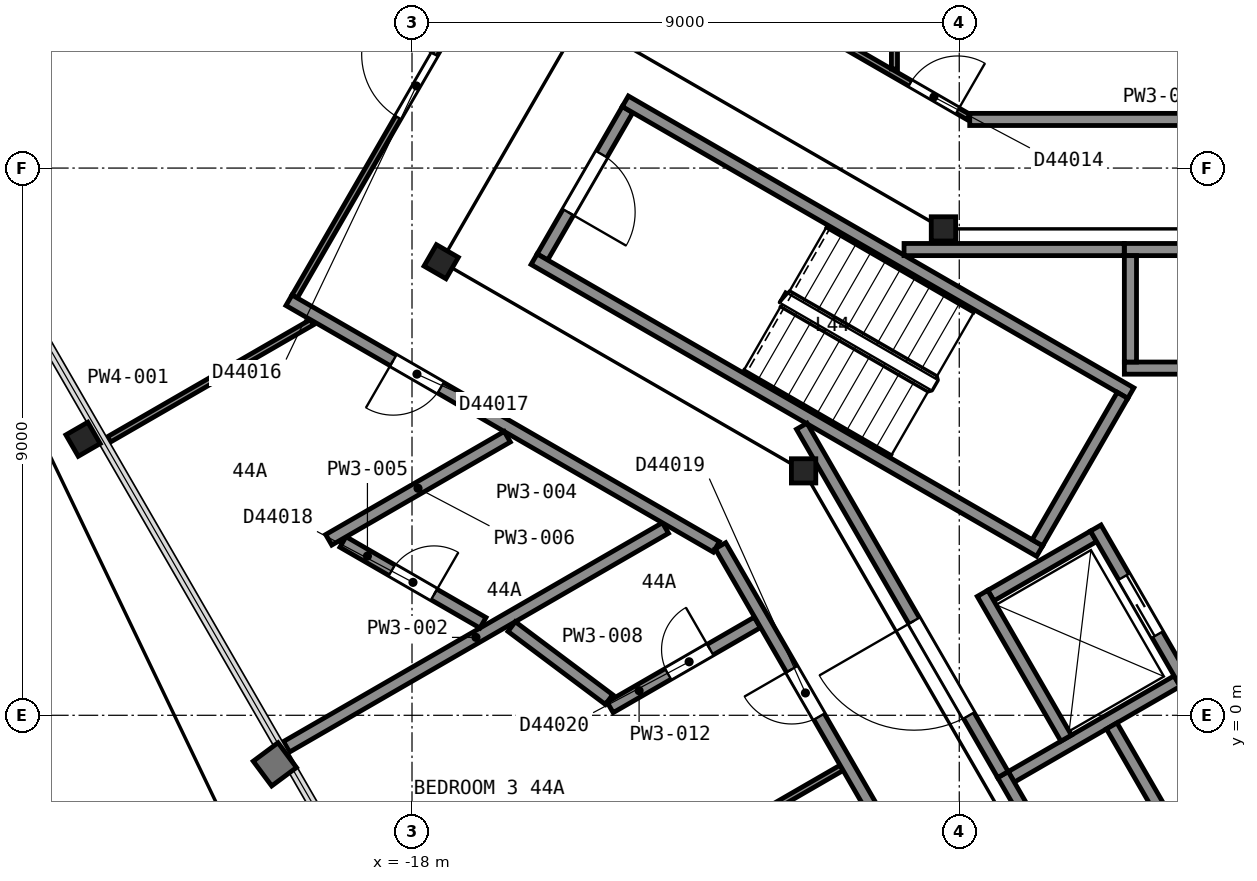
"""IFC4 building model, lengths in metres.
Left out: names, types, materials, properties, quantities, classifications, styles, units other than length and angle.
Written with IfcOpenShell. Run it as: python <this file> out.ifc"""

import sys

from ifc_helpers import new_model, si_unit, direction, frame, frame_2d, origin, origin_2d, place, context, subcontext, project, spatial, rectangle, i_section, extrude, element, fill, save


model = new_model("IFC4")
c1 = context("Model", 3, precision=1e-05, world=origin(), true_north=direction((0.0, 1.0)))
c2 = subcontext(c1, "Body", "Model", "MODEL_VIEW")
j1 = project(units=[si_unit("LENGTHUNIT", "METRE"), si_unit("PLANEANGLEUNIT", "RADIAN")], contexts=[c1])
p1 = place(None, origin())
s1 = spatial("IfcSite", under=j1, at=p1, CompositionType="ELEMENT")
p2 = place(p1, origin())
s2 = spatial("IfcBuilding", under=s1, at=p2, CompositionType="ELEMENT")
p3 = place(p2, frame((0.0, 0.0, 178.4)))
s3 = spatial("IfcBuildingStorey", under=s2, at=p3, CompositionType="ELEMENT", Elevation=178.4)
p4 = place(p3, frame((-23.41, 4.54, 0.04), z_axis=(0.0, 0.0, 1.0), x_axis=(-0.5, 0.866025403784, 0.0)))
e1 = element("IfcColumn", 1, at=p4, inside=s3, PredefinedType="COLUMN", context=c2, shape_type="SweptSolid", body=[
    extrude(i_section(OverallWidth=0.406, OverallDepth=0.417, WebThickness=0.03, FlangeThickness=0.048, FilletRadius=0.015, at=origin_2d()), origin(), (0.0, 0.0, 1.0), 3.66),
])
p5 = place(p3, frame((-9.26, 8.0, 0.0), z_axis=(0.0, 0.0, 1.0), x_axis=(1.0, 0.0, 0.0)))
e2 = element("IfcColumn", 2, at=p5, inside=s3, PredefinedType="COLUMN", context=c2, shape_type="SweptSolid", body=[
    extrude(i_section(OverallWidth=0.401, OverallDepth=0.399, WebThickness=0.025, FlangeThickness=0.04, FilletRadius=0.015, at=origin_2d()), origin(), (0.0, 0.0, 1.0), 3.7),
])
p6 = place(p3, frame((-17.52, 7.46, 0.0), z_axis=(0.0, 0.0, 1.0), x_axis=(0.5, 0.866025403784, 0.0)))
e3 = element("IfcColumn", 3, at=p6, inside=s3, PredefinedType="COLUMN", context=c2, shape_type="SweptSolid", body=[
    extrude(i_section(OverallWidth=0.406, OverallDepth=0.417, WebThickness=0.03, FlangeThickness=0.048, FilletRadius=0.015, at=origin_2d()), origin(), (0.0, 0.0, 1.0), 3.7),
])
p7 = place(p3, frame((-11.56, 4.02, 0.0), z_axis=(0.0, 0.0, 1.0), x_axis=(1.0, 0.0, 0.0)))
e4 = element("IfcColumn", 4, at=p7, inside=s3, PredefinedType="COLUMN", context=c2, shape_type="SweptSolid", body=[
    extrude(i_section(OverallWidth=0.401, OverallDepth=0.399, WebThickness=0.025, FlangeThickness=0.04, FilletRadius=0.015, at=origin_2d()), origin(), (0.0, 0.0, 1.0), 3.7),
])
p8 = place(p3, frame((-14.455, 9.962, 0.0), z_axis=(0.0, 0.0, 1.0), x_axis=(-0.500049511043, -0.865996816683, 0.0)))
e5 = element("IfcWall", 5, at=p8, inside=s3, PredefinedType="PARTITIONING", context=c2, shape_type="SweptSolid", body=[
    extrude(rectangle(XDim=2.8, YDim=0.2, at=frame_2d((1.4, 0.0))), origin(), (0.0, 0.0, 1.0), 3.45),
])
p9 = place(p8, frame((0.85, 0.0, 0.0)))
e6 = element("IfcOpeningElement", 6, at=p9, cuts=e5, PredefinedType="OPENING", context=c2, shape_type="SweptSolid", body=[
    extrude(rectangle(XDim=1.1, YDim=2.1, at=frame_2d((0.55, 1.05))), frame((0.0, 0.11, 0.0), z_axis=(0.0, -1.0, 0.0), x_axis=(1.0, 0.0, 0.0)), (0.0, 0.0, 1.0), 0.22),
])
for number, where, z_axis, x_axis in (
    (7, (-7.678, 2.701, 0.0), (0.0, 0.0, 1.0), (-0.866, 0.5, 0.0)),
    (8, (-6.178, 5.299, 0.0), (0.0, 0.0, 1.0), (-0.866, 0.5, 0.0)),
):
    element("IfcWall", number, at=place(p3, frame(where, z_axis=z_axis, x_axis=x_axis)), inside=s3, PredefinedType="PARTITIONING", context=c2, shape_type="SweptSolid", body=[
        extrude(rectangle(XDim=9.6, YDim=0.2, at=frame_2d((4.8, 0.0))), origin(), (0.0, 0.0, 1.0), 3.45),
    ])
p10 = place(p3, frame((-6.315, 5.262, 0.0), z_axis=(0.0, 0.0, 1.0), x_axis=(-0.500049511043, -0.865996816683, 0.0)))
e9 = element("IfcWall", 9, at=p10, inside=s3, PredefinedType="PARTITIONING", context=c2, shape_type="SweptSolid", body=[
    extrude(rectangle(XDim=2.8, YDim=0.2, at=frame_2d((1.4, 0.0))), origin(), (0.0, 0.0, 1.0), 3.45),
])
for number, where, z_axis, x_axis in (
    (10, (-6.285, 5.71, 0.0), (0.0, 0.0, 1.0), (1.0, 0.0, 0.0)),
    (11, (-6.285, 7.66, 0.0), (0.0, 0.0, 1.0), (1.0, 0.0, 0.0)),
):
    element("IfcWall", number, at=place(p3, frame(where, z_axis=z_axis, x_axis=x_axis)), inside=s3, PredefinedType="PARTITIONING", context=c2, shape_type="SweptSolid", body=[
        extrude(rectangle(XDim=2.35, YDim=0.2, at=frame_2d((1.175, 0.0))), origin(), (0.0, 0.0, 1.0), 3.7),
    ])
p11 = place(p3, frame((-8.145, -1.013, 0.0), z_axis=(0.0, 0.0, 1.0), x_axis=(0.866016494683, 0.500015430699, 0.0)))
e12 = element("IfcWall", 12, at=p11, inside=s3, PredefinedType="PARTITIONING", context=c2, shape_type="SweptSolid", body=[
    extrude(rectangle(XDim=3.15, YDim=0.2, at=frame_2d((1.575, 0.0))), origin(), (0.0, 0.0, 1.0), 3.7),
])
p12 = place(p3, frame((-8.48, 1.969, 0.0), z_axis=(0.0, 0.0, 1.0), x_axis=(0.866000020948, 0.500043961785, 0.0)))
e13 = element("IfcWall", 13, at=p12, inside=s3, PredefinedType="PARTITIONING", context=c2, shape_type="SweptSolid", body=[
    extrude(rectangle(XDim=1.95, YDim=0.2, at=frame_2d((0.975, 0.0))), origin(), (0.0, 0.0, 1.0), 3.7),
])
p13 = place(p3, frame((-6.185, 5.81, 0.0), z_axis=(0.0, 0.0, 1.0), x_axis=(0.0, 1.0, 0.0)))
e14 = element("IfcWall", 14, at=p13, inside=s3, PredefinedType="PARTITIONING", context=c2, shape_type="SweptSolid", body=[
    extrude(rectangle(XDim=1.75, YDim=0.2, at=frame_2d((0.875, 0.0))), origin(), (0.0, 0.0, 1.0), 3.7),
])
p14 = place(p3, frame((-5.28, 0.525, 0.0), z_axis=(0.0, 0.0, 1.0), x_axis=(-0.500037662692, 0.866003658127, 0.0)))
e15 = element("IfcWall", 15, at=p14, inside=s3, PredefinedType="PARTITIONING", context=c2, shape_type="SweptSolid", body=[
    extrude(rectangle(XDim=2.95, YDim=0.2, at=frame_2d((1.475, 0.0))), origin(), (0.0, 0.0, 1.0), 3.7),
])
p15 = place(p14, frame((0.925, 0.0, 0.0)))
e16 = element("IfcOpeningElement", 16, at=p15, cuts=e15, PredefinedType="OPENING", context=c2, shape_type="SweptSolid", body=[
    extrude(rectangle(XDim=1.1, YDim=2.1, at=frame_2d((0.55, 1.05))), frame((0.0, 0.11, 0.0), z_axis=(0.0, -1.0, 0.0), x_axis=(1.0, 0.0, 0.0)), (0.0, 0.0, 1.0), 0.22),
])
p16 = place(p3, frame((-5.318, -2.21, 0.0), z_axis=(0.0, 0.0, 1.0), x_axis=(-0.499938297808, 0.866061024631, 0.0)))
e17 = element("IfcWall", 17, at=p16, inside=s3, PredefinedType="PARTITIONING", context=c2, shape_type="SweptSolid", body=[
    extrude(rectangle(XDim=2.35, YDim=0.2, at=frame_2d((1.175, 0.0))), origin(), (0.0, 0.0, 1.0), 3.7),
])
p17 = place(p3, frame((-7.242, -0.376, 0.0), z_axis=(0.0, 0.0, 1.0), x_axis=(-0.499996545922, 0.866027397988, 0.0)))
e18 = element("IfcWall", 18, at=p17, inside=s3, PredefinedType="PARTITIONING", context=c2, shape_type="SweptSolid", body=[
    extrude(rectangle(XDim=2.75, YDim=0.2, at=frame_2d((1.375, 0.0))), origin(), (0.0, 0.0, 1.0), 3.7),
])
p18 = place(p3, frame((-7.006, -3.185, 0.0), z_axis=(0.0, 0.0, 1.0), x_axis=(-0.499990435942, 0.866030925526, 0.0)))
e19 = element("IfcWall", 19, at=p18, inside=s3, PredefinedType="PARTITIONING", context=c2, shape_type="SweptSolid", body=[
    extrude(rectangle(XDim=2.55, YDim=0.2, at=frame_2d((1.275, 0.0))), origin(), (0.0, 0.0, 1.0), 3.7),
])
p19 = place(p3, frame((-11.591, 4.755, 0.0), z_axis=(0.0, 0.0, 1.0), x_axis=(0.500043977787, -0.866000011708, 0.0)))
e20 = element("IfcWall", 20, at=p19, inside=s3, PredefinedType="PARTITIONING", context=c2, shape_type="SweptSolid", body=[
    extrude(rectangle(XDim=6.617, YDim=0.2, at=frame_2d((3.308, 0.0))), origin(), (0.0, 0.0, 1.0), 3.45),
])
p20 = place(p19, frame((3.695, 0.0, 0.0)))
e21 = element("IfcOpeningElement", 21, at=p20, cuts=e20, PredefinedType="OPENING", context=c2, shape_type="SweptSolid", body=[
    extrude(rectangle(XDim=1.8, YDim=2.1, at=frame_2d((0.9, 1.05))), frame((0.0, 0.11, 0.0), z_axis=(0.0, -1.0, 0.0), x_axis=(1.0, 0.0, 0.0)), (0.0, 0.0, 1.0), 0.22),
])
p21 = place(p3, frame((-9.908, 7.66, 0.0), z_axis=(0.0, 0.0, 1.0), x_axis=(1.0, 0.0, 0.0)))
e22 = element("IfcWall", 22, at=p21, inside=s3, PredefinedType="PARTITIONING", context=c2, shape_type="SweptSolid", body=[
    extrude(rectangle(XDim=3.621, YDim=0.2, at=frame_2d((1.811, 0.0))), origin(), (0.0, 0.0, 1.0), 3.45),
])
p22 = place(p3, frame((-22.983, 4.538, 0.0), z_axis=(0.0, 0.0, 1.0), x_axis=(0.865988254995, 0.500064338071, 0.0)))
e23 = element("IfcWall", 23, at=p22, inside=s3, PredefinedType="PARTITIONING", context=c2, shape_type="SweptSolid", body=[
    extrude(rectangle(XDim=3.853, YDim=0.1, at=frame_2d((1.927, 0.0))), origin(), (0.0, 0.0, 1.0), 2.713),
])
p23 = place(p3, frame((-20.064, -0.518, 0.0), z_axis=(0.0, 0.0, 1.0), x_axis=(0.865994046034, 0.500054309285, 0.0)))
e24 = element("IfcWall", 24, at=p23, inside=s3, PredefinedType="PARTITIONING", context=c2, shape_type="SweptSolid", body=[
    extrude(rectangle(XDim=7.196, YDim=0.2, at=frame_2d((3.598, 0.0))), origin(), (0.0, 0.0, 1.0), 2.713),
])
p24 = place(p3, frame((-19.93, 6.888, 0.0), z_axis=(0.0, 0.0, 1.0), x_axis=(0.500413056211, 0.865786794294, 0.0)))
e25 = element("IfcWall", 25, at=p24, inside=s3, PredefinedType="PARTITIONING", context=c2, shape_type="SweptSolid", body=[
    extrude(rectangle(XDim=8.047, YDim=0.1, at=frame_2d((4.023, 0.0))), origin(), (0.0, 0.0, 1.0), 2.713),
])
p25 = place(p24, frame((3.4, 0.0, 0.0)))
e26 = element("IfcOpeningElement", 26, at=p25, cuts=e25, PredefinedType="OPENING", context=c2, shape_type="SweptSolid", body=[
    extrude(rectangle(XDim=1.2, YDim=2.1, at=frame_2d((0.6, 1.05))), frame((0.0, 0.06, 0.0), z_axis=(0.0, -1.0, 0.0), x_axis=(1.0, 0.0, 0.0)), (0.0, 0.0, 1.0), 0.12),
])
p26 = place(p3, frame((-12.995, 2.77, 0.0), z_axis=(0.0, 0.0, 1.0), x_axis=(-0.866100425926, 0.499870035319, 0.0)))
e27 = element("IfcWall", 27, at=p26, inside=s3, PredefinedType="PARTITIONING", context=c2, shape_type="SweptSolid", body=[
    extrude(rectangle(XDim=8.115, YDim=0.2, at=frame_2d((4.058, 0.0))), origin(), (0.0, 0.0, 1.0), 2.713),
])
p27 = place(p26, frame((5.235, 0.0, 0.0)))
e28 = element("IfcOpeningElement", 28, at=p27, cuts=e27, PredefinedType="OPENING", context=c2, shape_type="SweptSolid", body=[
    extrude(rectangle(XDim=0.9, YDim=2.1, at=frame_2d((0.45, 1.05))), frame((0.0, 0.11, 0.0), z_axis=(0.0, -1.0, 0.0), x_axis=(1.0, 0.0, 0.0)), (0.0, 0.0, 1.0), 0.22),
])
p28 = place(p3, frame((-19.136, 2.851, 0.0), z_axis=(0.0, 0.0, 1.0), x_axis=(0.866008217664, -0.500029766052, 0.0)))
e29 = element("IfcWall", 29, at=p28, inside=s3, PredefinedType="PARTITIONING", context=c2, shape_type="SweptSolid", body=[
    extrude(rectangle(XDim=2.659, YDim=0.2, at=frame_2d((1.33, 0.0))), origin(), (0.0, 0.0, 1.0), 2.713),
])
p29 = place(p28, frame((0.93, 0.0, 0.0)))
e30 = element("IfcOpeningElement", 30, at=p29, cuts=e29, PredefinedType="OPENING", context=c2, shape_type="SweptSolid", body=[
    extrude(rectangle(XDim=0.8, YDim=2.1, at=frame_2d((0.4, 1.05))), frame((0.0, 0.11, 0.0), z_axis=(0.0, -1.0, 0.0), x_axis=(1.0, 0.0, 0.0)), (0.0, 0.0, 1.0), 0.22),
])
p30 = place(p3, frame((-19.37, 2.886, 0.0), z_axis=(0.0, 0.0, 1.0), x_axis=(0.866036909293, 0.499980071345, 0.0)))
e31 = element("IfcWall", 31, at=p30, inside=s3, PredefinedType="PARTITIONING", context=c2, shape_type="SweptSolid", body=[
    extrude(rectangle(XDim=3.391, YDim=0.2, at=frame_2d((1.695, 0.0))), origin(), (0.0, 0.0, 1.0), 2.713),
])
p31 = place(p3, frame((-17.632, -4.731, 0.0), z_axis=(0.0, 0.0, 1.0), x_axis=(0.866002098189, 0.500040364304, 0.0)))
e32 = element("IfcWall", 32, at=p31, inside=s3, PredefinedType="PARTITIONING", context=c2, shape_type="SweptSolid", body=[
    extrude(rectangle(XDim=7.733, YDim=0.1, at=frame_2d((3.867, 0.0))), origin(), (0.0, 0.0, 1.0), 2.713),
])
p32 = place(p3, frame((-16.362, 1.459, 0.0), z_axis=(0.0, 0.0, 1.0), x_axis=(0.800219351666, -0.59970741968, 0.0)))
e33 = element("IfcWall", 33, at=p32, inside=s3, PredefinedType="PARTITIONING", context=c2, shape_type="SweptSolid", body=[
    extrude(rectangle(XDim=2.003, YDim=0.2, at=frame_2d((1.001, 0.0))), origin(), (0.0, 0.0, 1.0), 2.713),
])
p33 = place(p3, frame((-15.921, 13.923, 0.0), z_axis=(0.0, 0.0, 1.0), x_axis=(0.866088973199, -0.499889878377, 0.0)))
e34 = element("IfcWall", 34, at=p33, inside=s3, PredefinedType="PARTITIONING", context=c2, shape_type="SweptSolid", body=[
    extrude(rectangle(XDim=8.163, YDim=0.1, at=frame_2d((4.082, 0.0))), origin(), (0.0, 0.0, 1.0), 2.713),
])
p34 = place(p33, frame((7.06, 0.0, 0.0)))
e35 = element("IfcOpeningElement", 35, at=p34, cuts=e34, PredefinedType="OPENING", context=c2, shape_type="SweptSolid", body=[
    extrude(rectangle(XDim=0.9, YDim=2.1, at=frame_2d((0.45, 1.05))), frame((0.0, 0.06, 0.0), z_axis=(0.0, -1.0, 0.0), x_axis=(1.0, 0.0, 0.0)), (0.0, 0.0, 1.0), 0.12),
])
p35 = place(p33, frame((3.226, 0.0, 0.0)))
e36 = element("IfcOpeningElement", 36, at=p35, cuts=e34, PredefinedType="OPENING", context=c2, shape_type="SweptSolid", body=[
    extrude(rectangle(XDim=0.9, YDim=2.1, at=frame_2d((0.45, 1.05))), frame((0.0, 0.06, 0.0), z_axis=(0.0, -1.0, 0.0), x_axis=(1.0, 0.0, 0.0)), (0.0, 0.0, 1.0), 0.12),
])
p36 = place(p3, frame((-14.742, 0.13, 0.0), z_axis=(0.0, 0.0, 1.0), x_axis=(0.866003766563, 0.500037474894, 0.0)))
e37 = element("IfcWall", 37, at=p36, inside=s3, PredefinedType="PARTITIONING", context=c2, shape_type="SweptSolid", body=[
    extrude(rectangle(XDim=2.795, YDim=0.2, at=frame_2d((1.397, 0.0))), origin(), (0.0, 0.0, 1.0), 2.713),
])
p37 = place(p36, frame((1.1, 0.0, 0.0)))
e38 = element("IfcOpeningElement", 38, at=p37, cuts=e37, PredefinedType="OPENING", context=c2, shape_type="SweptSolid", body=[
    extrude(rectangle(XDim=0.8, YDim=2.1, at=frame_2d((0.4, 1.05))), frame((0.0, 0.11, 0.0), z_axis=(0.0, -1.0, 0.0), x_axis=(1.0, 0.0, 0.0)), (0.0, 0.0, 1.0), 0.22),
])
p38 = place(p3, frame((-4.075, -12.545, 0.0), z_axis=(0.0, 0.0, 1.0), x_axis=(-0.499997769292, 0.86602669168, 0.0)))
e39 = element("IfcWall", 39, at=p38, inside=s3, PredefinedType="PARTITIONING", context=c2, shape_type="SweptSolid", body=[
    extrude(rectangle(XDim=17.706, YDim=0.2, at=frame_2d((8.853, 0.0))), origin(), (0.0, 0.0, 1.0), 2.713),
])
p39 = place(p38, frame((14.46, 0.0, 0.0)))
e40 = element("IfcOpeningElement", 40, at=p39, cuts=e39, PredefinedType="OPENING", context=c2, shape_type="SweptSolid", body=[
    extrude(rectangle(XDim=0.9, YDim=2.1, at=frame_2d((0.45, 1.05))), frame((0.0, 0.11, 0.0), z_axis=(0.0, -1.0, 0.0), x_axis=(1.0, 0.0, 0.0)), (0.0, 0.0, 1.0), 0.22),
])
p40 = place(p38, frame((10.896, 0.0, 0.0)))
e41 = element("IfcOpeningElement", 41, at=p40, cuts=e39, PredefinedType="OPENING", context=c2, shape_type="SweptSolid", body=[
    extrude(rectangle(XDim=0.9, YDim=2.1, at=frame_2d((0.45, 1.05))), frame((0.0, 0.11, 0.0), z_axis=(0.0, -1.0, 0.0), x_axis=(1.0, 0.0, 0.0)), (0.0, 0.0, 1.0), 0.22),
])
p41 = place(p38, frame((6.068, 0.0, 0.0)))
e42 = element("IfcOpeningElement", 42, at=p41, cuts=e39, PredefinedType="OPENING", context=c2, shape_type="SweptSolid", body=[
    extrude(rectangle(XDim=0.9, YDim=2.1, at=frame_2d((0.45, 1.05))), frame((0.0, 0.11, 0.0), z_axis=(0.0, -1.0, 0.0), x_axis=(1.0, 0.0, 0.0)), (0.0, 0.0, 1.0), 0.22),
])
p42 = place(p3, frame((-10.066, 10.631, 0.0), z_axis=(0.0, 0.0, 1.0), x_axis=(0.0, 1.0, 0.0)))
e43 = element("IfcWall", 43, at=p42, inside=s3, PredefinedType="PARTITIONING", context=c2, shape_type="SweptSolid", body=[
    extrude(rectangle(XDim=7.004, YDim=0.1, at=frame_2d((3.502, 0.0))), origin(), (0.0, 0.0, 1.0), 2.713),
])
p43 = place(p3, frame((-8.828, 9.8, 0.0), z_axis=(0.0, 0.0, 1.0), x_axis=(1.0, 0.0, 0.0)))
e44 = element("IfcWall", 44, at=p43, inside=s3, PredefinedType="PARTITIONING", context=c2, shape_type="SweptSolid", body=[
    extrude(rectangle(XDim=17.656, YDim=0.2, at=frame_2d((8.828, 0.0))), origin(), (0.0, 0.0, 1.0), 2.713),
])
p44 = place(p43, frame((11.723, 0.0, 0.0)))
e45 = element("IfcOpeningElement", 45, at=p44, cuts=e44, PredefinedType="OPENING", context=c2, shape_type="SweptSolid", body=[
    extrude(rectangle(XDim=0.9, YDim=2.1, at=frame_2d((0.45, 1.05))), frame((0.0, 0.11, 0.0), z_axis=(0.0, -1.0, 0.0), x_axis=(1.0, 0.0, 0.0)), (0.0, 0.0, 1.0), 0.22),
])
p45 = place(p43, frame((6.367, 0.0, 0.0)))
e46 = element("IfcOpeningElement", 46, at=p45, cuts=e44, PredefinedType="OPENING", context=c2, shape_type="SweptSolid", body=[
    extrude(rectangle(XDim=0.9, YDim=2.1, at=frame_2d((0.45, 1.05))), frame((0.0, 0.11, 0.0), z_axis=(0.0, -1.0, 0.0), x_axis=(1.0, 0.0, 0.0)), (0.0, 0.0, 1.0), 0.22),
])
p46 = place(p9, origin())
e47 = element("IfcDoor", 47, at=p46, inside=s3, OperationType="SINGLE_SWING_RIGHT", PredefinedType="DOOR", context=c2, shape_type="SweptSolid", body=[
    extrude(rectangle(XDim=1.1, YDim=2.1, at=frame_2d((0.55, 1.05))), frame((0.0, 0.025, 0.0), z_axis=(0.0, -1.0, 0.0), x_axis=(1.0, 0.0, 0.0)), (0.0, 0.0, 1.0), 0.05),
])
fill(e6, e47)
p47 = place(p15, origin())
e48 = element("IfcDoor", 48, at=p47, inside=s3, OperationType="SLIDING_TO_LEFT", PredefinedType="DOOR", context=c2, shape_type="SweptSolid", body=[
    extrude(rectangle(XDim=1.1, YDim=2.1, at=frame_2d((0.55, 1.05))), frame((0.0, 0.025, 0.0), z_axis=(0.0, -1.0, 0.0), x_axis=(1.0, 0.0, 0.0)), (0.0, 0.0, 1.0), 0.05),
])
fill(e16, e48)
p48 = place(p20, origin())
e49 = element("IfcDoor", 49, at=p48, inside=s3, OperationType="DOUBLE_DOOR_SINGLE_SWING", PredefinedType="DOOR", context=c2, shape_type="SweptSolid", body=[
    extrude(rectangle(XDim=1.8, YDim=2.1, at=frame_2d((0.9, 1.05))), frame((0.0, 0.025, 0.0), z_axis=(0.0, -1.0, 0.0), x_axis=(1.0, 0.0, 0.0)), (0.0, 0.0, 1.0), 0.05),
])
fill(e21, e49)
p49 = place(p25, origin())
e50 = element("IfcDoor", 50, at=p49, inside=s3, OperationType="SINGLE_SWING_RIGHT", PredefinedType="DOOR", context=c2, shape_type="SweptSolid", body=[
    extrude(rectangle(XDim=1.2, YDim=2.1, at=frame_2d((0.6, 1.05))), frame((0.0, 0.025, 0.0), z_axis=(0.0, -1.0, 0.0), x_axis=(1.0, 0.0, 0.0)), (0.0, 0.0, 1.0), 0.05),
])
fill(e26, e50)
p50 = place(p27, origin())
e51 = element("IfcDoor", 51, at=p50, inside=s3, OperationType="SINGLE_SWING_RIGHT", PredefinedType="DOOR", context=c2, shape_type="SweptSolid", body=[
    extrude(rectangle(XDim=0.9, YDim=2.1, at=frame_2d((0.45, 1.05))), frame((0.0, 0.025, 0.0), z_axis=(0.0, -1.0, 0.0), x_axis=(1.0, 0.0, 0.0)), (0.0, 0.0, 1.0), 0.05),
])
fill(e28, e51)
p51 = place(p29, origin())
e52 = element("IfcDoor", 52, at=p51, inside=s3, OperationType="SINGLE_SWING_RIGHT", PredefinedType="DOOR", context=c2, shape_type="SweptSolid", body=[
    extrude(rectangle(XDim=0.8, YDim=2.1, at=frame_2d((0.4, 1.05))), frame((0.0, 0.025, 0.0), z_axis=(0.0, -1.0, 0.0), x_axis=(1.0, 0.0, 0.0)), (0.0, 0.0, 1.0), 0.05),
])
fill(e30, e52)
p52 = place(p34, origin())
e53 = element("IfcDoor", 53, at=p52, inside=s3, OperationType="SINGLE_SWING_RIGHT", PredefinedType="DOOR", context=c2, shape_type="SweptSolid", body=[
    extrude(rectangle(XDim=0.9, YDim=2.1, at=frame_2d((0.45, 1.05))), frame((0.0, 0.025, 0.0), z_axis=(0.0, -1.0, 0.0), x_axis=(1.0, 0.0, 0.0)), (0.0, 0.0, 1.0), 0.05),
])
fill(e35, e53)
p53 = place(p37, origin())
e54 = element("IfcDoor", 54, at=p53, inside=s3, OperationType="SINGLE_SWING_RIGHT", PredefinedType="DOOR", context=c2, shape_type="SweptSolid", body=[
    extrude(rectangle(XDim=0.8, YDim=2.1, at=frame_2d((0.4, 1.05))), frame((0.0, 0.025, 0.0), z_axis=(0.0, -1.0, 0.0), x_axis=(1.0, 0.0, 0.0)), (0.0, 0.0, 1.0), 0.05),
])
fill(e38, e54)
p54 = place(p39, origin())
e55 = element("IfcDoor", 55, at=p54, inside=s3, OperationType="SINGLE_SWING_RIGHT", PredefinedType="DOOR", context=c2, shape_type="SweptSolid", body=[
    extrude(rectangle(XDim=0.9, YDim=2.1, at=frame_2d((0.45, 1.05))), frame((0.0, 0.025, 0.0), z_axis=(0.0, -1.0, 0.0), x_axis=(1.0, 0.0, 0.0)), (0.0, 0.0, 1.0), 0.05),
])
fill(e40, e55)
save(model, sys.argv[1])
